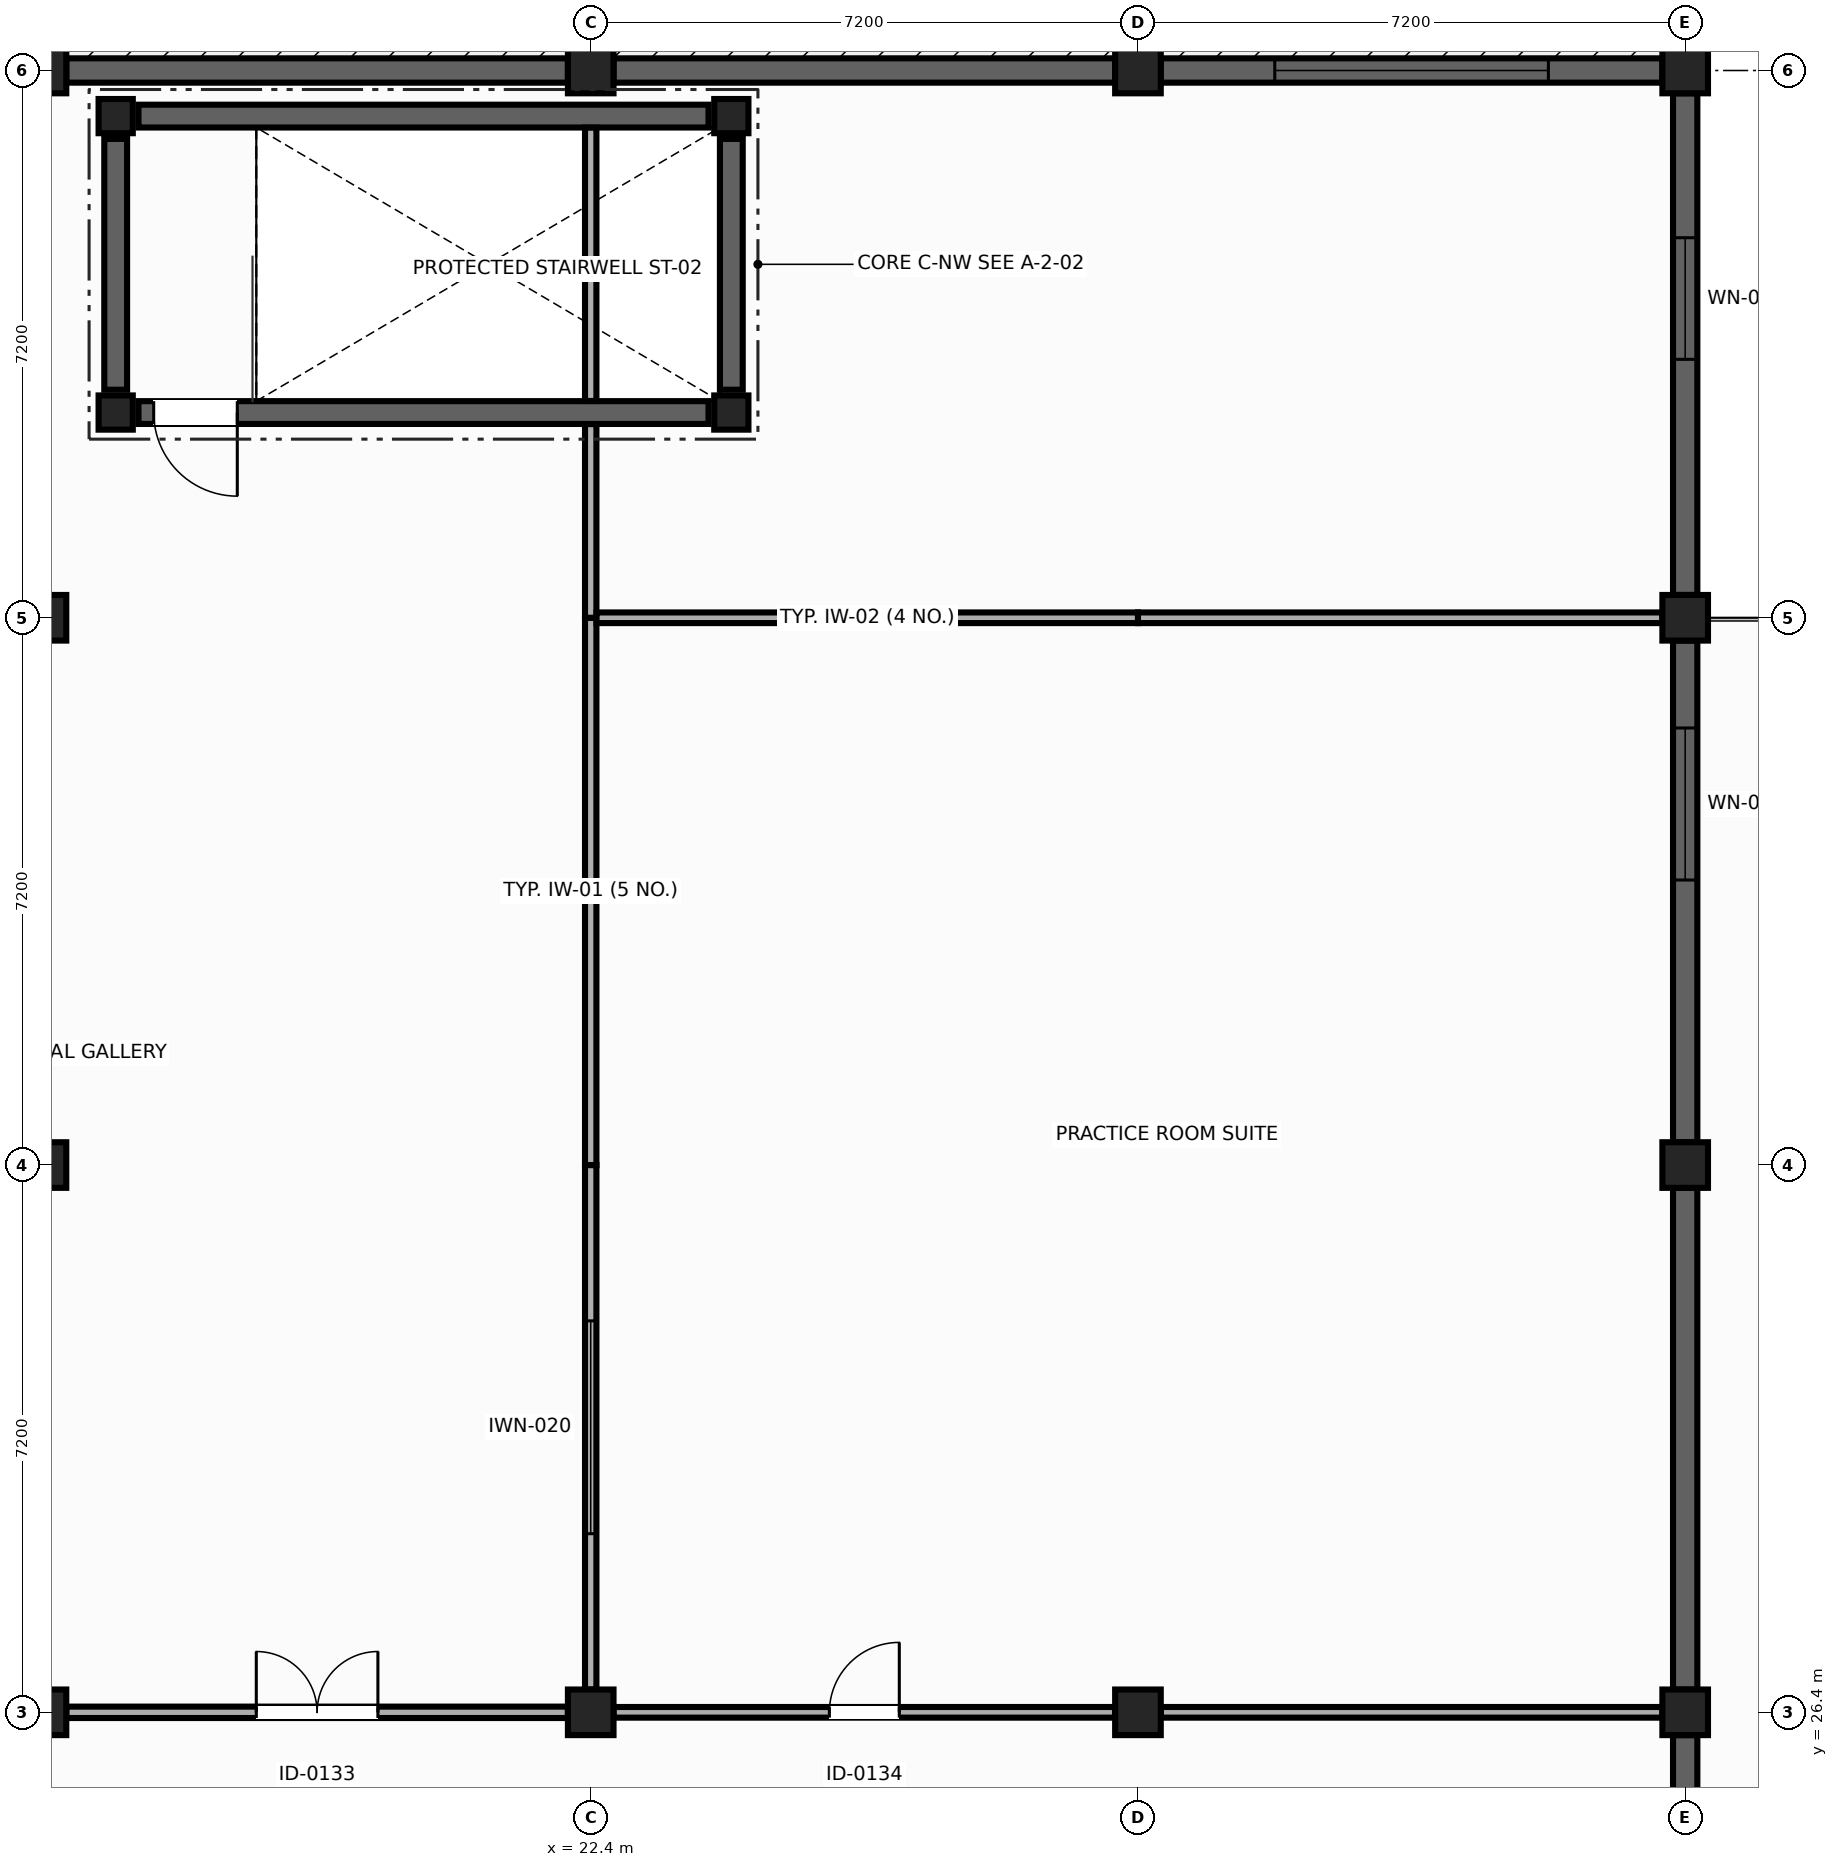
"""IFC4 building model, lengths in metres.
Left out: names, types, materials, properties, quantities, classifications, styles, units other than length and angle.
Written with IfcOpenShell. Run it as: python <this file> out.ifc"""

import sys

from ifc_helpers import new_model, si_unit, direction, frame, frame_2d, origin, origin_2d, place, context, subcontext, project, spatial, rectangle, extrude, element, fill, save


model = new_model("IFC4")
c1 = context("Model", 3, precision=1e-05, world=origin(), true_north=direction((0.0, 1.0)))
c2 = subcontext(c1, "Body", "Model", "MODEL_VIEW")
j1 = project(units=[si_unit("LENGTHUNIT", "METRE"), si_unit("PLANEANGLEUNIT", "RADIAN")], contexts=[c1])
p1 = place(None, origin())
s1 = spatial("IfcSite", under=j1, at=p1, CompositionType="ELEMENT")
p2 = place(p1, origin())
s2 = spatial("IfcBuilding", under=s1, at=p2, CompositionType="ELEMENT")
p3 = place(p2, frame((0.0, 0.0, 9.9)))
s3 = spatial("IfcBuildingStorey", under=s2, at=p3, CompositionType="ELEMENT", Elevation=9.9)
p4 = place(p3, frame((15.2, 26.4, 0.0), z_axis=(0.0, 0.0, 1.0), x_axis=(0.0, 1.0, 0.0)))
e1 = element("IfcColumn", 1, at=p4, inside=s3, PredefinedType="COLUMN", context=c2, shape_type="SweptSolid", body=[
    extrude(rectangle(XDim=0.6, YDim=0.6, at=origin_2d()), origin(), (0.0, 0.0, 1.0), 6.213),
])
p5 = place(p3, frame((22.4, 26.4, 0.0), z_axis=(0.0, 0.0, 1.0), x_axis=(1.0, 0.0, 0.0)))
e2 = element("IfcColumn", 2, at=p5, inside=s3, PredefinedType="COLUMN", context=c2, shape_type="SweptSolid", body=[
    extrude(rectangle(XDim=0.6, YDim=0.6, at=origin_2d()), origin(), (0.0, 0.0, 1.0), 8.113),
])
p6 = place(p3, frame((29.6, 26.4, 0.0), z_axis=(0.0, 0.0, 1.0), x_axis=(1.0, 0.0, 0.0)))
e3 = element("IfcColumn", 3, at=p6, inside=s3, PredefinedType="COLUMN", context=c2, shape_type="SweptSolid", body=[
    extrude(rectangle(XDim=0.6, YDim=0.6, at=origin_2d()), origin(), (0.0, 0.0, 1.0), 6.213),
])
p7 = place(p3, frame((36.8, 26.4, 0.0), z_axis=(0.0, 0.0, 1.0), x_axis=(0.0, 1.0, 0.0)))
e4 = element("IfcColumn", 4, at=p7, inside=s3, PredefinedType="COLUMN", context=c2, shape_type="SweptSolid", body=[
    extrude(rectangle(XDim=0.6, YDim=0.6, at=origin_2d()), origin(), (0.0, 0.0, 1.0), 4.5),
])
p8 = place(p3, frame((15.2, 33.6, 0.0), z_axis=(0.0, 0.0, 1.0), x_axis=(1.0, 0.0, 0.0)))
e5 = element("IfcColumn", 5, at=p8, inside=s3, PredefinedType="COLUMN", context=c2, shape_type="SweptSolid", body=[
    extrude(rectangle(XDim=0.6, YDim=0.6, at=origin_2d()), origin(), (0.0, 0.0, 1.0), 6.213),
])
p9 = place(p3, frame((36.8, 33.6, 0.0), z_axis=(0.0, 0.0, 1.0), x_axis=(1.0, 0.0, 0.0)))
e6 = element("IfcColumn", 6, at=p9, inside=s3, PredefinedType="COLUMN", context=c2, shape_type="SweptSolid", body=[
    extrude(rectangle(XDim=0.6, YDim=0.6, at=origin_2d()), origin(), (0.0, 0.0, 1.0), 4.5),
])
p10 = place(p3, frame((15.2, 40.8, 0.0), z_axis=(0.0, 0.0, 1.0), x_axis=(1.0, 0.0, 0.0)))
e7 = element("IfcColumn", 7, at=p10, inside=s3, PredefinedType="COLUMN", context=c2, shape_type="SweptSolid", body=[
    extrude(rectangle(XDim=0.6, YDim=0.6, at=origin_2d()), origin(), (0.0, 0.0, 1.0), 6.213),
])
p11 = place(p3, frame((36.8, 40.8, 0.0), z_axis=(0.0, 0.0, 1.0), x_axis=(0.0, 1.0, 0.0)))
e8 = element("IfcColumn", 8, at=p11, inside=s3, PredefinedType="COLUMN", context=c2, shape_type="SweptSolid", body=[
    extrude(rectangle(XDim=0.6, YDim=0.6, at=origin_2d()), origin(), (0.0, 0.0, 1.0), 4.5),
])
p12 = place(p3, frame((15.2, 48.0, 0.0), z_axis=(0.0, 0.0, 1.0), x_axis=(0.0, 1.0, 0.0)))
e9 = element("IfcColumn", 9, at=p12, inside=s3, PredefinedType="COLUMN", context=c2, shape_type="SweptSolid", body=[
    extrude(rectangle(XDim=0.6, YDim=0.6, at=origin_2d()), origin(), (0.0, 0.0, 1.0), 6.213),
])
p13 = place(p3, frame((22.4, 48.0, 0.0), z_axis=(0.0, 0.0, 1.0), x_axis=(1.0, 0.0, 0.0)))
e10 = element("IfcColumn", 10, at=p13, inside=s3, PredefinedType="COLUMN", context=c2, shape_type="SweptSolid", body=[
    extrude(rectangle(XDim=0.6, YDim=0.6, at=origin_2d()), origin(), (0.0, 0.0, 1.0), 8.113),
])
p14 = place(p3, frame((29.6, 48.0, 0.0), z_axis=(0.0, 0.0, 1.0), x_axis=(0.0, 1.0, 0.0)))
e11 = element("IfcColumn", 11, at=p14, inside=s3, PredefinedType="COLUMN", context=c2, shape_type="SweptSolid", body=[
    extrude(rectangle(XDim=0.6, YDim=0.6, at=origin_2d()), origin(), (0.0, 0.0, 1.0), 6.213),
])
p15 = place(p3, frame((36.8, 48.0, 0.0), z_axis=(0.0, 0.0, 1.0), x_axis=(1.0, 0.0, 0.0)))
e12 = element("IfcColumn", 12, at=p15, inside=s3, PredefinedType="COLUMN", context=c2, shape_type="SweptSolid", body=[
    extrude(rectangle(XDim=0.6, YDim=0.6, at=origin_2d()), origin(), (0.0, 0.0, 1.0), 4.313),
])
p16 = place(p3, frame((16.15, 43.5, 0.0), z_axis=(0.0, 0.0, 1.0), x_axis=(1.0, 0.0, 0.0)))
e13 = element("IfcColumn", 13, at=p16, inside=s3, PredefinedType="COLUMN", context=c2, shape_type="SweptSolid", body=[
    extrude(rectangle(XDim=0.45, YDim=0.45, at=origin_2d()), origin(), (0.0, 0.0, 1.0), 6.464),
])
for number, where, z_axis, x_axis in (
    (14, (24.25, 43.5, 0.0), (0.0, 0.0, 1.0), (1.0, 0.0, 0.0)),
    (15, (24.25, 47.4, 0.0), (0.0, 0.0, 1.0), (1.0, 0.0, 0.0)),
):
    element("IfcColumn", number, at=place(p3, frame(where, z_axis=z_axis, x_axis=x_axis)), inside=s3, PredefinedType="COLUMN", context=c2, shape_type="SweptSolid", body=[
        extrude(rectangle(XDim=0.45, YDim=0.45, at=origin_2d()), origin(), (0.0, 0.0, 1.0), 7.625),
    ])
p17 = place(p3, frame((16.15, 47.4, 0.0), z_axis=(0.0, 0.0, 1.0), x_axis=(1.0, 0.0, 0.0)))
e16 = element("IfcColumn", 16, at=p17, inside=s3, PredefinedType="COLUMN", context=c2, shape_type="SweptSolid", body=[
    extrude(rectangle(XDim=0.45, YDim=0.45, at=origin_2d()), origin(), (0.0, 0.0, 1.0), 6.464),
])
for number, where, z_axis, x_axis in (
    (17, (15.5, 48.0, 0.0), (0.0, 0.0, 1.0), (1.0, 0.0, 0.0)),
    (18, (22.7, 48.0, 0.0), (0.0, 0.0, 1.0), (1.0, 0.0, 0.0)),
):
    element("IfcWall", number, at=place(p3, frame(where, z_axis=z_axis, x_axis=x_axis)), inside=s3, PredefinedType="SOLIDWALL", context=c2, shape_type="SweptSolid", body=[
        extrude(rectangle(XDim=6.6, YDim=0.32, at=frame_2d((3.3, 0.0))), origin(), (0.0, 0.0, 1.0), 4.5),
    ])
p18 = place(p3, frame((29.9, 48.0, 0.0), z_axis=(0.0, 0.0, 1.0), x_axis=(1.0, 0.0, 0.0)))
e19 = element("IfcWall", 19, at=p18, inside=s3, PredefinedType="SOLIDWALL", context=c2, shape_type="SweptSolid", body=[
    extrude(rectangle(XDim=6.6, YDim=0.32, at=frame_2d((3.3, 0.0))), origin(), (0.0, 0.0, 1.0), 4.5),
])
p19 = place(p18, frame((1.5, 0.0, 1.8)))
e20 = element("IfcOpeningElement", 20, at=p19, cuts=e19, PredefinedType="OPENING", context=c2, shape_type="SweptSolid", body=[
    extrude(rectangle(XDim=3.6, YDim=1.2, at=frame_2d((1.8, 0.6))), frame((0.0, 0.17, 0.0), z_axis=(0.0, -1.0, 0.0), x_axis=(1.0, 0.0, 0.0)), (0.0, 0.0, 1.0), 0.34),
])
p20 = place(p3, frame((36.8, 47.7, 0.0), z_axis=(0.0, 0.0, 1.0), x_axis=(0.0, -1.0, 0.0)))
e21 = element("IfcWall", 21, at=p20, inside=s3, PredefinedType="SOLIDWALL", context=c2, shape_type="SweptSolid", body=[
    extrude(rectangle(XDim=6.6, YDim=0.32, at=frame_2d((3.3, 0.0))), origin(), (0.0, 0.0, 1.0), 4.313),
])
p21 = place(p20, frame((1.9, 0.0, 0.9)))
e22 = element("IfcOpeningElement", 22, at=p21, cuts=e21, PredefinedType="OPENING", context=c2, shape_type="SweptSolid", body=[
    extrude(rectangle(XDim=1.6, YDim=2.4, at=frame_2d((0.8, 1.2))), frame((0.0, 0.17, 0.0), z_axis=(0.0, -1.0, 0.0), x_axis=(1.0, 0.0, 0.0)), (0.0, 0.0, 1.0), 0.34),
])
p22 = place(p3, frame((36.8, 40.5, 0.0), z_axis=(0.0, 0.0, 1.0), x_axis=(0.0, -1.0, 0.0)))
e23 = element("IfcWall", 23, at=p22, inside=s3, PredefinedType="SOLIDWALL", context=c2, shape_type="SweptSolid", body=[
    extrude(rectangle(XDim=6.6, YDim=0.32, at=frame_2d((3.3, 0.0))), origin(), (0.0, 0.0, 1.0), 4.22),
])
p23 = place(p22, frame((1.15, 0.0, 0.9)))
e24 = element("IfcOpeningElement", 24, at=p23, cuts=e23, PredefinedType="OPENING", context=c2, shape_type="SweptSolid", body=[
    extrude(rectangle(XDim=2.0, YDim=2.4, at=frame_2d((1.0, 1.2))), frame((0.0, 0.17, 0.0), z_axis=(0.0, -1.0, 0.0), x_axis=(1.0, 0.0, 0.0)), (0.0, 0.0, 1.0), 0.34),
])
for number, where, z_axis, x_axis in (
    (25, (36.8, 33.3, 0.0), (0.0, 0.0, 1.0), (0.0, -1.0, 0.0)),
    (26, (36.8, 26.1, 0.0), (0.0, 0.0, 1.0), (0.0, -1.0, 0.0)),
):
    element("IfcWall", number, at=place(p3, frame(where, z_axis=z_axis, x_axis=x_axis)), inside=s3, PredefinedType="SOLIDWALL", context=c2, shape_type="SweptSolid", body=[
        extrude(rectangle(XDim=6.6, YDim=0.32, at=frame_2d((3.3, 0.0))), origin(), (0.0, 0.0, 1.0), 4.22),
    ])
p24 = place(p3, frame((23.95, 43.5, 0.0), z_axis=(0.0, 0.0, 1.0), x_axis=(-1.0, 0.0, 0.0)))
e27 = element("IfcWall", 27, at=p24, inside=s3, PredefinedType="SHEAR", context=c2, shape_type="SweptSolid", body=[
    extrude(rectangle(XDim=7.5, YDim=0.3, at=frame_2d((3.75, 0.0))), origin(), (0.0, 0.0, 1.0), 7.532),
])
p25 = place(p24, frame((6.2, 0.0, 0.0)))
e28 = element("IfcOpeningElement", 28, at=p25, cuts=e27, PredefinedType="OPENING", context=c2, shape_type="SweptSolid", body=[
    extrude(rectangle(XDim=1.1, YDim=2.15, at=frame_2d((0.55, 1.075))), frame((0.0, 0.16, 0.0), z_axis=(0.0, -1.0, 0.0), x_axis=(1.0, 0.0, 0.0)), (0.0, 0.0, 1.0), 0.32),
])
p26 = place(p3, frame((16.15, 43.8, 0.0), z_axis=(0.0, 0.0, 1.0), x_axis=(0.0, 1.0, 0.0)))
e29 = element("IfcWall", 29, at=p26, inside=s3, PredefinedType="SHEAR", context=c2, shape_type="SweptSolid", body=[
    extrude(rectangle(XDim=3.3, YDim=0.3, at=frame_2d((1.65, 0.0))), origin(), (0.0, 0.0, 1.0), 6.464),
])
p27 = place(p3, frame((16.45, 47.4, 0.0), z_axis=(0.0, 0.0, 1.0), x_axis=(1.0, 0.0, 0.0)))
e30 = element("IfcWall", 30, at=p27, inside=s3, PredefinedType="SHEAR", context=c2, shape_type="SweptSolid", body=[
    extrude(rectangle(XDim=7.5, YDim=0.3, at=frame_2d((3.75, 0.0))), origin(), (0.0, 0.0, 1.0), 7.532),
])
p28 = place(p3, frame((24.25, 47.1, 0.0), z_axis=(0.0, 0.0, 1.0), x_axis=(0.0, -1.0, 0.0)))
e31 = element("IfcWall", 31, at=p28, inside=s3, PredefinedType="SHEAR", context=c2, shape_type="SweptSolid", body=[
    extrude(rectangle(XDim=3.3, YDim=0.3, at=frame_2d((1.65, 0.0))), origin(), (0.0, 0.0, 1.0), 7.625),
])
p29 = place(p3, frame((22.4, 26.7, 0.0), z_axis=(0.0, 0.0, 1.0), x_axis=(0.0, 1.0, 0.0)))
e32 = element("IfcWall", 32, at=p29, inside=s3, PredefinedType="PARTITIONING", context=c2, shape_type="SweptSolid", body=[
    extrude(rectangle(XDim=6.9, YDim=0.15, at=frame_2d((3.45, 0.0))), origin(), (0.0, 0.0, 1.0), 7.551),
])
p30 = place(p29, frame((2.05, 0.0, 1.1)))
e33 = element("IfcOpeningElement", 33, at=p30, cuts=e32, PredefinedType="OPENING", context=c2, shape_type="SweptSolid", body=[
    extrude(rectangle(XDim=2.8, YDim=1.1, at=frame_2d((1.4, 0.55))), frame((0.0, 0.085, 0.0), z_axis=(0.0, -1.0, 0.0), x_axis=(1.0, 0.0, 0.0)), (0.0, 0.0, 1.0), 0.17),
])
p31 = place(p3, frame((22.4, 33.6, 0.0), z_axis=(0.0, 0.0, 1.0), x_axis=(0.0, 1.0, 0.0)))
e34 = element("IfcWall", 34, at=p31, inside=s3, PredefinedType="PARTITIONING", context=c2, shape_type="SweptSolid", body=[
    extrude(rectangle(XDim=7.2, YDim=0.15, at=frame_2d((3.6, 0.0))), origin(), (0.0, 0.0, 1.0), 7.551),
])
p32 = place(p3, frame((22.4, 43.652, 0.0), z_axis=(0.0, 0.0, 1.0), x_axis=(0.0, 1.0, 0.0)))
e35 = element("IfcWall", 35, at=p32, inside=s3, PredefinedType="PARTITIONING", context=c2, shape_type="SweptSolid", body=[
    extrude(rectangle(XDim=3.596, YDim=0.15, at=frame_2d((1.798, 0.0))), origin(), (0.0, 0.0, 1.0), 7.551),
])
p33 = place(p3, frame((22.4, 40.8, 0.0), z_axis=(0.0, 0.0, 1.0), x_axis=(0.0, 1.0, 0.0)))
e36 = element("IfcWall", 36, at=p33, inside=s3, PredefinedType="PARTITIONING", context=c2, shape_type="SweptSolid", body=[
    extrude(rectangle(XDim=2.548, YDim=0.15, at=frame_2d((1.274, 0.0))), origin(), (0.0, 0.0, 1.0), 7.551),
])
p34 = place(p3, frame((15.5, 26.4, 0.0), z_axis=(0.0, 0.0, 1.0), x_axis=(1.0, 0.0, 0.0)))
e37 = element("IfcWall", 37, at=p34, inside=s3, PredefinedType="PARTITIONING", context=c2, shape_type="SweptSolid", body=[
    extrude(rectangle(XDim=6.6, YDim=0.15, at=frame_2d((3.3, 0.0))), origin(), (0.0, 0.0, 1.0), 7.163),
])
p35 = place(p34, frame((2.5, 0.0, 0.0)))
e38 = element("IfcOpeningElement", 38, at=p35, cuts=e37, PredefinedType="OPENING", context=c2, shape_type="SweptSolid", body=[
    extrude(rectangle(XDim=1.6, YDim=2.25, at=frame_2d((0.8, 1.125))), frame((0.0, 0.085, 0.0), z_axis=(0.0, -1.0, 0.0), x_axis=(1.0, 0.0, 0.0)), (0.0, 0.0, 1.0), 0.17),
])
p36 = place(p3, frame((36.5, 40.8, 0.0), z_axis=(0.0, 0.0, 1.0), x_axis=(-1.0, 0.0, 0.0)))
e39 = element("IfcWall", 39, at=p36, inside=s3, PredefinedType="PARTITIONING", context=c2, shape_type="SweptSolid", body=[
    extrude(rectangle(XDim=6.9, YDim=0.14, at=frame_2d((3.45, 0.0))), origin(), (0.0, 0.0, 1.0), 5.302),
])
p37 = place(p3, frame((29.6, 40.8, 0.0), z_axis=(0.0, 0.0, 1.0), x_axis=(-1.0, 0.0, 0.0)))
e40 = element("IfcWall", 40, at=p37, inside=s3, PredefinedType="PARTITIONING", context=c2, shape_type="SweptSolid", body=[
    extrude(rectangle(XDim=7.123, YDim=0.14, at=frame_2d((3.562, 0.0))), origin(), (0.0, 0.0, 1.0), 7.153),
])
p38 = place(p3, frame((22.7, 26.4, 0.0), z_axis=(0.0, 0.0, 1.0), x_axis=(1.0, 0.0, 0.0)))
e41 = element("IfcWall", 41, at=p38, inside=s3, PredefinedType="PARTITIONING", context=c2, shape_type="SweptSolid", body=[
    extrude(rectangle(XDim=6.6, YDim=0.14, at=frame_2d((3.3, 0.0))), origin(), (0.0, 0.0, 1.0), 7.163),
])
p39 = place(p38, frame((2.84, 0.0, 0.0)))
e42 = element("IfcOpeningElement", 42, at=p39, cuts=e41, PredefinedType="OPENING", context=c2, shape_type="SweptSolid", body=[
    extrude(rectangle(XDim=0.92, YDim=2.1, at=frame_2d((0.46, 1.05))), frame((0.0, 0.08, 0.0), z_axis=(0.0, -1.0, 0.0), x_axis=(1.0, 0.0, 0.0)), (0.0, 0.0, 1.0), 0.16),
])
p40 = place(p3, frame((29.9, 26.4, 0.0), z_axis=(0.0, 0.0, 1.0), x_axis=(1.0, 0.0, 0.0)))
e43 = element("IfcWall", 43, at=p40, inside=s3, PredefinedType="PARTITIONING", context=c2, shape_type="SweptSolid", body=[
    extrude(rectangle(XDim=6.6, YDim=0.14, at=frame_2d((3.3, 0.0))), origin(), (0.0, 0.0, 1.0), 5.263),
])
p41 = place(p19, origin())
e44 = element("IfcWindow", 44, at=p41, inside=s3, PartitioningType="SINGLE_PANEL", PredefinedType="WINDOW", context=c2, shape_type="SweptSolid", body=[
    extrude(rectangle(XDim=3.6, YDim=1.2, at=frame_2d((1.8, 0.6))), frame((0.0, 0.03, 0.0), z_axis=(0.0, -1.0, 0.0), x_axis=(1.0, 0.0, 0.0)), (0.0, 0.0, 1.0), 0.06),
])
fill(e20, e44)
p42 = place(p21, origin())
e45 = element("IfcWindow", 45, at=p42, inside=s3, PartitioningType="SINGLE_PANEL", PredefinedType="WINDOW", context=c2, shape_type="SweptSolid", body=[
    extrude(rectangle(XDim=1.6, YDim=2.4, at=frame_2d((0.8, 1.2))), frame((0.0, 0.03, 0.0), z_axis=(0.0, -1.0, 0.0), x_axis=(1.0, 0.0, 0.0)), (0.0, 0.0, 1.0), 0.06),
])
fill(e22, e45)
p43 = place(p23, origin())
e46 = element("IfcWindow", 46, at=p43, inside=s3, PartitioningType="SINGLE_PANEL", PredefinedType="WINDOW", context=c2, shape_type="SweptSolid", body=[
    extrude(rectangle(XDim=2.0, YDim=2.4, at=frame_2d((1.0, 1.2))), frame((0.0, 0.03, 0.0), z_axis=(0.0, -1.0, 0.0), x_axis=(1.0, 0.0, 0.0)), (0.0, 0.0, 1.0), 0.06),
])
fill(e24, e46)
p44 = place(p25, origin())
e47 = element("IfcDoor", 47, at=p44, inside=s3, OperationType="SINGLE_SWING_LEFT", PredefinedType="DOOR", context=c2, shape_type="SweptSolid", body=[
    extrude(rectangle(XDim=1.1, YDim=2.15, at=frame_2d((0.55, 1.075))), frame((0.0, 0.025, 0.0), z_axis=(0.0, -1.0, 0.0), x_axis=(1.0, 0.0, 0.0)), (0.0, 0.0, 1.0), 0.05),
])
fill(e28, e47)
p45 = place(p35, origin())
e48 = element("IfcDoor", 48, at=p45, inside=s3, OperationType="DOUBLE_DOOR_SINGLE_SWING", PredefinedType="DOOR", context=c2, shape_type="SweptSolid", body=[
    extrude(rectangle(XDim=1.6, YDim=2.25, at=frame_2d((0.8, 1.125))), frame((0.0, 0.025, 0.0), z_axis=(0.0, -1.0, 0.0), x_axis=(1.0, 0.0, 0.0)), (0.0, 0.0, 1.0), 0.05),
])
fill(e38, e48)
p46 = place(p30, origin())
e49 = element("IfcWindow", 49, at=p46, inside=s3, PartitioningType="SINGLE_PANEL", PredefinedType="WINDOW", context=c2, shape_type="SweptSolid", body=[
    extrude(rectangle(XDim=2.8, YDim=1.1, at=frame_2d((1.4, 0.55))), frame((0.0, 0.03, 0.0), z_axis=(0.0, -1.0, 0.0), x_axis=(1.0, 0.0, 0.0)), (0.0, 0.0, 1.0), 0.06),
])
fill(e33, e49)
p47 = place(p39, origin())
e50 = element("IfcDoor", 50, at=p47, inside=s3, OperationType="SINGLE_SWING_RIGHT", PredefinedType="DOOR", context=c2, shape_type="SweptSolid", body=[
    extrude(rectangle(XDim=0.92, YDim=2.1, at=frame_2d((0.46, 1.05))), frame((0.0, 0.025, 0.0), z_axis=(0.0, -1.0, 0.0), x_axis=(1.0, 0.0, 0.0)), (0.0, 0.0, 1.0), 0.05),
])
fill(e42, e50)
save(model, sys.argv[1])
